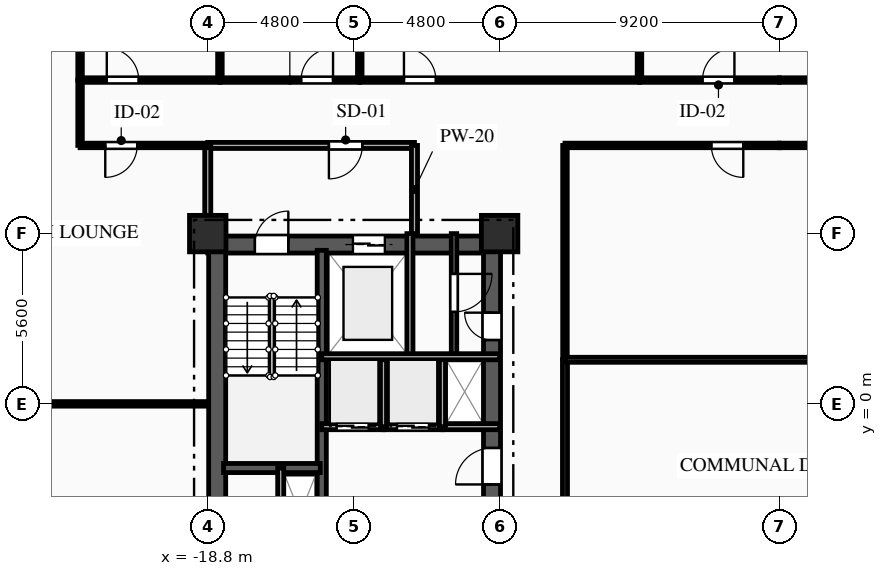
"""IFC4 building model, lengths in metres.
Left out: names, types, materials, properties, quantities, classifications, styles, units other than length and angle.
Written with IfcOpenShell. Run it as: python <this file> out.ifc"""

import sys

from ifc_helpers import new_model, si_unit, direction, frame, frame_2d, origin, origin_2d, place, context, subcontext, project, spatial, rectangle, extrude, element, fill, save


model = new_model("IFC4")
c1 = context("Model", 3, precision=1e-05, world=origin(), true_north=direction((0.0, 1.0)))
c2 = subcontext(c1, "Body", "Model", "MODEL_VIEW")
j1 = project(units=[si_unit("LENGTHUNIT", "METRE"), si_unit("PLANEANGLEUNIT", "RADIAN")], contexts=[c1])
p1 = place(None, origin())
s1 = spatial("IfcSite", under=j1, at=p1, CompositionType="ELEMENT")
p2 = place(p1, origin())
s2 = spatial("IfcBuilding", under=s1, at=p2, CompositionType="ELEMENT")
p3 = place(p2, frame((0.0, 0.0, 27.0)))
s3 = spatial("IfcBuildingStorey", under=s2, at=p3, CompositionType="ELEMENT", Elevation=27.0)
for number, where, z_axis, x_axis in (
    (1, (-18.8, 5.6, 0.0), (0.0, 0.0, 1.0), (1.0, 0.0, 0.0)),
    (2, (-9.2, 5.6, 0.0), (0.0, 0.0, 1.0), (1.0, 0.0, 0.0)),
):
    element("IfcColumn", number, at=place(p3, frame(where, z_axis=z_axis, x_axis=x_axis)), inside=s3, PredefinedType="COLUMN", context=c2, shape_type="SweptSolid", body=[
        extrude(rectangle(XDim=1.2, YDim=1.2, at=origin_2d()), origin(), (0.0, 0.0, 1.0), 3.35),
    ])
p4 = place(p3, frame((-18.8, 5.24, 0.0), z_axis=(0.0, 0.0, 1.0), x_axis=(1.0, 0.0, 0.0)))
e3 = element("IfcWall", 3, at=p4, inside=s3, PredefinedType="SHEAR", context=c2, shape_type="SweptSolid", body=[
    extrude(rectangle(XDim=9.6, YDim=0.56, at=frame_2d((4.8, 0.0))), origin(), (0.0, 0.0, 1.0), 3.035),
])
p5 = place(p4, frame((1.55, 0.0, 0.0)))
e4 = element("IfcOpeningElement", 4, at=p5, cuts=e3, PredefinedType="OPENING", context=c2, shape_type="SweptSolid", body=[
    extrude(rectangle(XDim=1.1, YDim=2.15, at=frame_2d((0.55, 1.075))), frame((0.0, 0.29, 0.0), z_axis=(0.0, -1.0, 0.0), x_axis=(1.0, 0.0, 0.0)), (0.0, 0.0, 1.0), 0.58),
])
p6 = place(p4, frame((4.775, 0.0, 0.0)))
e5 = element("IfcOpeningElement", 5, at=p6, cuts=e3, PredefinedType="OPENING", context=c2, shape_type="SweptSolid", body=[
    extrude(rectangle(XDim=1.05, YDim=2.1, at=frame_2d((0.525, 1.05))), frame((0.0, 0.29, 0.0), z_axis=(0.0, -1.0, 0.0), x_axis=(1.0, 0.0, 0.0)), (0.0, 0.0, 1.0), 0.58),
])
p7 = place(p3, frame((-18.49, -5.05, 0.0), z_axis=(0.0, 0.0, 1.0), x_axis=(0.0, 1.0, 0.0)))
e6 = element("IfcWall", 6, at=p7, inside=s3, PredefinedType="SHEAR", context=c2, shape_type="SweptSolid", body=[
    extrude(rectangle(XDim=10.1, YDim=0.56, at=frame_2d((5.05, 0.0))), origin(), (0.0, 0.0, 1.0), 3.035),
])
p8 = place(p3, frame((-9.45, -5.05, 0.0), z_axis=(0.0, 0.0, 1.0), x_axis=(0.0, 1.0, 0.0)))
e7 = element("IfcWall", 7, at=p8, inside=s3, PredefinedType="SHEAR", context=c2, shape_type="SweptSolid", body=[
    extrude(rectangle(XDim=10.1, YDim=0.56, at=frame_2d((5.05, 0.0))), origin(), (0.0, 0.0, 1.0), 3.035),
])
p9 = place(p8, frame((7.15, 0.0, 0.0)))
e8 = element("IfcOpeningElement", 8, at=p9, cuts=e7, PredefinedType="OPENING", context=c2, shape_type="SweptSolid", body=[
    extrude(rectangle(XDim=0.9, YDim=2.1, at=frame_2d((0.45, 1.05))), frame((0.0, 0.29, 0.0), z_axis=(0.0, -1.0, 0.0), x_axis=(1.0, 0.0, 0.0)), (0.0, 0.0, 1.0), 0.58),
])
p10 = place(p8, frame((2.4, 0.0, 0.0)))
e9 = element("IfcOpeningElement", 9, at=p10, cuts=e7, PredefinedType="OPENING", context=c2, shape_type="SweptSolid", body=[
    extrude(rectangle(XDim=1.2, YDim=2.15, at=frame_2d((0.6, 1.075))), frame((0.0, 0.29, 0.0), z_axis=(0.0, -1.0, 0.0), x_axis=(1.0, 0.0, 0.0)), (0.0, 0.0, 1.0), 0.58),
])
p11 = place(p3, frame((-15.05, -5.05, 0.0), z_axis=(0.0, 0.0, 1.0), x_axis=(0.0, 1.0, 0.0)))
e10 = element("IfcWall", 10, at=p11, inside=s3, PredefinedType="SHEAR", context=c2, shape_type="SweptSolid", body=[
    extrude(rectangle(XDim=10.1, YDim=0.3, at=frame_2d((5.05, 0.0))), origin(), (0.0, 0.0, 1.0), 3.035),
])
p12 = place(p3, frame((-18.28, -2.11, 0.0), z_axis=(0.0, 0.0, 1.0), x_axis=(1.0, 0.0, 0.0)))
e11 = element("IfcWall", 11, at=p12, inside=s3, PredefinedType="SHEAR", context=c2, shape_type="SweptSolid", body=[
    extrude(rectangle(XDim=3.18, YDim=0.3, at=frame_2d((1.59, 0.0))), origin(), (0.0, 0.0, 1.0), 3.035),
])
p13 = place(p3, frame((-16.4, -5.6, 0.0), z_axis=(0.0, 0.0, 1.0), x_axis=(0.0, 1.0, 0.0)))
e12 = element("IfcWall", 12, at=p13, inside=s3, PredefinedType="PARTITIONING", context=c2, shape_type="SweptSolid", body=[
    extrude(rectangle(XDim=3.49, YDim=0.2, at=frame_2d((1.745, 0.0))), origin(), (0.0, 0.0, 1.0), 3.035),
])
p14 = place(p3, frame((-12.15, 1.55, 0.0), z_axis=(0.0, 0.0, 1.0), x_axis=(0.0, 1.0, 0.0)))
e13 = element("IfcWall", 13, at=p14, inside=s3, PredefinedType="PARTITIONING", context=c2, shape_type="SweptSolid", body=[
    extrude(rectangle(XDim=4.05, YDim=0.2, at=frame_2d((2.025, 0.0))), origin(), (0.0, 0.0, 1.0), 3.035),
])
p15 = place(p3, frame((-12.0, 8.5, 0.0), z_axis=(0.0, 0.0, 1.0), x_axis=(-1.0, 0.0, 0.0)))
e14 = element("IfcWall", 14, at=p15, inside=s3, PredefinedType="PARTITIONING", context=c2, shape_type="SweptSolid", body=[
    extrude(rectangle(XDim=6.8, YDim=0.2, at=frame_2d((3.4, 0.0))), origin(), (0.0, 0.0, 1.0), 3.035),
])
p16 = place(p15, frame((1.715, 0.0, 0.0)))
e15 = element("IfcOpeningElement", 15, at=p16, cuts=e14, PredefinedType="OPENING", context=c2, shape_type="SweptSolid", body=[
    extrude(rectangle(XDim=1.1, YDim=2.15, at=frame_2d((0.55, 1.075))), frame((0.0, 0.11, 0.0), z_axis=(0.0, -1.0, 0.0), x_axis=(1.0, 0.0, 0.0)), (0.0, 0.0, 1.0), 0.22),
])
p17 = place(p3, frame((-12.0, 5.6, 0.0), z_axis=(0.0, 0.0, 1.0), x_axis=(0.0, 1.0, 0.0)))
e16 = element("IfcWall", 16, at=p17, inside=s3, PredefinedType="PARTITIONING", context=c2, shape_type="SweptSolid", body=[
    extrude(rectangle(XDim=2.9, YDim=0.2, at=frame_2d((1.45, 0.0))), origin(), (0.0, 0.0, 1.0), 3.035),
])
p18 = place(p3, frame((-18.8, 8.5, 0.0), z_axis=(0.0, 0.0, 1.0), x_axis=(0.0, -1.0, 0.0)))
e17 = element("IfcWall", 17, at=p18, inside=s3, PredefinedType="PARTITIONING", context=c2, shape_type="SweptSolid", body=[
    extrude(rectangle(XDim=2.9, YDim=0.2, at=frame_2d((1.45, 0.0))), origin(), (0.0, 0.0, 1.0), 2.52),
])
p19 = place(p3, frame((-10.7, 5.6, 0.0), z_axis=(0.0, 0.0, 1.0), x_axis=(0.0, -1.0, 0.0)))
e18 = element("IfcWall", 18, at=p19, inside=s3, PredefinedType="PARTITIONING", context=c2, shape_type="SweptSolid", body=[
    extrude(rectangle(XDim=4.05, YDim=0.18, at=frame_2d((2.025, 0.0))), origin(), (0.0, 0.0, 1.0), 3.035),
])
p20 = place(p19, frame((1.325, 0.0, 0.0)))
e19 = element("IfcOpeningElement", 19, at=p20, cuts=e18, PredefinedType="OPENING", context=c2, shape_type="SweptSolid", body=[
    extrude(rectangle(XDim=1.25, YDim=2.2, at=frame_2d((0.625, 1.1))), frame((0.0, 0.1, 0.0), z_axis=(0.0, -1.0, 0.0), x_axis=(1.0, 0.0, 0.0)), (0.0, 0.0, 1.0), 0.2),
])
p21 = place(p3, frame((-13.02, -0.75, 0.0), z_axis=(0.0, 0.0, 1.0), x_axis=(-1.0, 0.0, 0.0)))
e20 = element("IfcWall", 20, at=p21, inside=s3, PredefinedType="PARTITIONING", context=c2, shape_type="SweptSolid", body=[
    extrude(rectangle(XDim=2.03, YDim=0.2, at=frame_2d((1.015, 0.0))), origin(), (0.0, 0.0, 1.0), 3.035),
])
p22 = place(p21, frame((0.49, 0.0, 0.0)))
e21 = element("IfcOpeningElement", 21, at=p22, cuts=e20, PredefinedType="OPENING", context=c2, shape_type="SweptSolid", body=[
    extrude(rectangle(XDim=1.05, YDim=2.1, at=frame_2d((0.525, 1.05))), frame((0.0, 0.11, 0.0), z_axis=(0.0, -1.0, 0.0), x_axis=(1.0, 0.0, 0.0)), (0.0, 0.0, 1.0), 0.22),
])
p23 = place(p3, frame((-11.08, -0.75, 0.0), z_axis=(0.0, 0.0, 1.0), x_axis=(-1.0, 0.0, 0.0)))
e22 = element("IfcWall", 22, at=p23, inside=s3, PredefinedType="PARTITIONING", context=c2, shape_type="SweptSolid", body=[
    extrude(rectangle(XDim=1.94, YDim=0.2, at=frame_2d((0.97, 0.0))), origin(), (0.0, 0.0, 1.0), 3.035),
])
p24 = place(p23, frame((0.445, 0.0, 0.0)))
e23 = element("IfcOpeningElement", 23, at=p24, cuts=e22, PredefinedType="OPENING", context=c2, shape_type="SweptSolid", body=[
    extrude(rectangle(XDim=1.05, YDim=2.1, at=frame_2d((0.525, 1.05))), frame((0.0, 0.11, 0.0), z_axis=(0.0, -1.0, 0.0), x_axis=(1.0, 0.0, 0.0)), (0.0, 0.0, 1.0), 0.22),
])
p25 = place(p3, frame((-9.2, -0.75, 0.0), z_axis=(0.0, 0.0, 1.0), x_axis=(-1.0, 0.0, 0.0)))
e24 = element("IfcWall", 24, at=p25, inside=s3, PredefinedType="PARTITIONING", context=c2, shape_type="SweptSolid", body=[
    extrude(rectangle(XDim=1.88, YDim=0.2, at=frame_2d((0.94, 0.0))), origin(), (0.0, 0.0, 1.0), 3.035),
])
for number, where, z_axis, x_axis in (
    (25, (-13.02, -0.75, 0.0), (0.0, 0.0, 1.0), (0.0, 1.0, 0.0)),
    (26, (-11.08, -0.75, 0.0), (0.0, 0.0, 1.0), (0.0, 1.0, 0.0)),
):
    element("IfcWall", number, at=place(p3, frame(where, z_axis=z_axis, x_axis=x_axis)), inside=s3, PredefinedType="PARTITIONING", context=c2, shape_type="SweptSolid", body=[
        extrude(rectangle(XDim=2.3, YDim=0.2, at=frame_2d((1.15, 0.0))), origin(), (0.0, 0.0, 1.0), 3.035),
    ])
p26 = place(p3, frame((-18.8, 8.5, 0.0), z_axis=(0.0, 0.0, 1.0), x_axis=(-1.0, 0.0, 0.0)))
e27 = element("IfcWall", 27, at=p26, inside=s3, PredefinedType="PARTITIONING", context=c2, shape_type="SweptSolid", body=[
    extrude(rectangle(XDim=4.2, YDim=0.15, at=frame_2d((2.1, 0.0))), origin(), (0.0, 0.0, 1.0), 3.035),
])
p27 = place(p26, frame((2.321, 0.0, 0.0)))
e28 = element("IfcOpeningElement", 28, at=p27, cuts=e27, PredefinedType="OPENING", context=c2, shape_type="SweptSolid", body=[
    extrude(rectangle(XDim=1.05, YDim=2.15, at=frame_2d((0.525, 1.075))), frame((0.0, 0.085, 0.0), z_axis=(0.0, -1.0, 0.0), x_axis=(1.0, 0.0, 0.0)), (0.0, 0.0, 1.0), 0.17),
])
p28 = place(p3, frame((-23.0, 8.5, 0.0), z_axis=(0.0, 0.0, 1.0), x_axis=(0.0, 1.0, 0.0)))
e29 = element("IfcWall", 29, at=p28, inside=s3, PredefinedType="PARTITIONING", context=c2, shape_type="SweptSolid", body=[
    extrude(rectangle(XDim=2.15, YDim=0.15, at=frame_2d((1.075, 0.0))), origin(), (0.0, 0.0, 1.0), 3.035),
])
p29 = place(p3, frame((-23.0, 10.65, 0.0), z_axis=(0.0, 0.0, 1.0), x_axis=(1.0, 0.0, 0.0)))
e30 = element("IfcWall", 30, at=p29, inside=s3, PredefinedType="PARTITIONING", context=c2, shape_type="SweptSolid", body=[
    extrude(rectangle(XDim=4.6, YDim=0.15, at=frame_2d((2.3, 0.0))), origin(), (0.0, 0.0, 1.0), 3.035),
])
p30 = place(p29, frame((0.879, 0.0, 0.0)))
e31 = element("IfcOpeningElement", 31, at=p30, cuts=e30, PredefinedType="OPENING", context=c2, shape_type="SweptSolid", body=[
    extrude(rectangle(XDim=1.05, YDim=2.15, at=frame_2d((0.525, 1.075))), frame((0.0, 0.085, 0.0), z_axis=(0.0, -1.0, 0.0), x_axis=(1.0, 0.0, 0.0)), (0.0, 0.0, 1.0), 0.17),
])
p31 = place(p3, frame((-18.4, 10.65, 0.0), z_axis=(0.0, 0.0, 1.0), x_axis=(1.0, 0.0, 0.0)))
e32 = element("IfcWall", 32, at=p31, inside=s3, PredefinedType="PARTITIONING", context=c2, shape_type="SweptSolid", body=[
    extrude(rectangle(XDim=4.6, YDim=0.15, at=frame_2d((2.3, 0.0))), origin(), (0.0, 0.0, 1.0), 3.035),
])
p32 = place(p31, frame((2.671, 0.0, 0.0)))
e33 = element("IfcOpeningElement", 33, at=p32, cuts=e32, PredefinedType="OPENING", context=c2, shape_type="SweptSolid", body=[
    extrude(rectangle(XDim=1.05, YDim=2.15, at=frame_2d((0.525, 1.075))), frame((0.0, 0.085, 0.0), z_axis=(0.0, -1.0, 0.0), x_axis=(1.0, 0.0, 0.0)), (0.0, 0.0, 1.0), 0.17),
])
p33 = place(p3, frame((-13.8, 10.65, 0.0), z_axis=(0.0, 0.0, 1.0), x_axis=(1.0, 0.0, 0.0)))
e34 = element("IfcWall", 34, at=p33, inside=s3, PredefinedType="PARTITIONING", context=c2, shape_type="SweptSolid", body=[
    extrude(rectangle(XDim=9.2, YDim=0.15, at=frame_2d((4.6, 0.0))), origin(), (0.0, 0.0, 1.0), 3.035),
])
p34 = place(p33, frame((1.454, 0.0, 0.0)))
e35 = element("IfcOpeningElement", 35, at=p34, cuts=e34, PredefinedType="OPENING", context=c2, shape_type="SweptSolid", body=[
    extrude(rectangle(XDim=1.05, YDim=2.15, at=frame_2d((0.525, 1.075))), frame((0.0, 0.085, 0.0), z_axis=(0.0, -1.0, 0.0), x_axis=(1.0, 0.0, 0.0)), (0.0, 0.0, 1.0), 0.17),
])
p35 = place(p3, frame((-4.6, 10.65, 0.0), z_axis=(0.0, 0.0, 1.0), x_axis=(1.0, 0.0, 0.0)))
e36 = element("IfcWall", 36, at=p35, inside=s3, PredefinedType="PARTITIONING", context=c2, shape_type="SweptSolid", body=[
    extrude(rectangle(XDim=4.6, YDim=0.15, at=frame_2d((2.3, 0.0))), origin(), (0.0, 0.0, 1.0), 3.035),
])
p36 = place(p35, frame((2.074, 0.0, 0.0)))
e37 = element("IfcOpeningElement", 37, at=p36, cuts=e36, PredefinedType="OPENING", context=c2, shape_type="SweptSolid", body=[
    extrude(rectangle(XDim=1.05, YDim=2.15, at=frame_2d((0.525, 1.075))), frame((0.0, 0.085, 0.0), z_axis=(0.0, -1.0, 0.0), x_axis=(1.0, 0.0, 0.0)), (0.0, 0.0, 1.0), 0.17),
])
p37 = place(p3, frame((0.0, 8.5, 0.0), z_axis=(0.0, 0.0, 1.0), x_axis=(-1.0, 0.0, 0.0)))
e38 = element("IfcWall", 38, at=p37, inside=s3, PredefinedType="PARTITIONING", context=c2, shape_type="SweptSolid", body=[
    extrude(rectangle(XDim=7.05, YDim=0.15, at=frame_2d((3.525, 0.0))), origin(), (0.0, 0.0, 1.0), 3.035),
])
p38 = place(p37, frame((1.185, 0.0, 0.0)))
e39 = element("IfcOpeningElement", 39, at=p38, cuts=e38, PredefinedType="OPENING", context=c2, shape_type="SweptSolid", body=[
    extrude(rectangle(XDim=1.05, YDim=2.15, at=frame_2d((0.525, 1.075))), frame((0.0, 0.085, 0.0), z_axis=(0.0, -1.0, 0.0), x_axis=(1.0, 0.0, 0.0)), (0.0, 0.0, 1.0), 0.17),
])
p39 = place(p3, frame((0.0, 10.65, 0.0), z_axis=(0.0, 0.0, 1.0), x_axis=(1.0, 0.0, 0.0)))
e40 = element("IfcWall", 40, at=p39, inside=s3, PredefinedType="PARTITIONING", context=c2, shape_type="SweptSolid", body=[
    extrude(rectangle(XDim=4.6, YDim=0.15, at=frame_2d((2.3, 0.0))), origin(), (0.0, 0.0, 1.0), 3.035),
])
p40 = place(p3, frame((7.05, 8.5, 0.0), z_axis=(0.0, 0.0, 1.0), x_axis=(-1.0, 0.0, 0.0)))
e41 = element("IfcWall", 41, at=p40, inside=s3, PredefinedType="PARTITIONING", context=c2, shape_type="SweptSolid", body=[
    extrude(rectangle(XDim=7.05, YDim=0.15, at=frame_2d((3.525, 0.0))), origin(), (0.0, 0.0, 1.0), 3.035),
])
p41 = place(p3, frame((-7.05, 1.45, 0.0), z_axis=(0.0, 0.0, 1.0), x_axis=(0.0, -1.0, 0.0)))
e42 = element("IfcWall", 42, at=p41, inside=s3, PredefinedType="PARTITIONING", context=c2, shape_type="SweptSolid", body=[
    extrude(rectangle(XDim=7.05, YDim=0.165, at=frame_2d((3.525, 0.0))), origin(), (0.0, 0.0, 1.0), 3.035),
])
p42 = place(p3, frame((-7.05, 8.5, 0.0), z_axis=(0.0, 0.0, 1.0), x_axis=(0.0, -1.0, 0.0)))
e43 = element("IfcWall", 43, at=p42, inside=s3, PredefinedType="PARTITIONING", context=c2, shape_type="SweptSolid", body=[
    extrude(rectangle(XDim=7.05, YDim=0.15, at=frame_2d((3.525, 0.0))), origin(), (0.0, 0.0, 1.0), 3.035),
])
p43 = place(p3, frame((-32.8, 0.0, 0.0), z_axis=(0.0, 0.0, 1.0), x_axis=(1.0, 0.0, 0.0)))
e44 = element("IfcWall", 44, at=p43, inside=s3, PredefinedType="PARTITIONING", context=c2, shape_type="SweptSolid", body=[
    extrude(rectangle(XDim=14.0, YDim=0.15, at=frame_2d((7.0, 0.0))), origin(), (0.0, 0.0, 1.0), 3.035),
])
for number, where, z_axis, x_axis in (
    (45, (-23.0, 19.4, 0.0), (0.0, 0.0, 1.0), (0.0, -1.0, 0.0)),
    (46, (-18.4, 19.4, 0.0), (0.0, 0.0, 1.0), (0.0, -1.0, 0.0)),
    (47, (-13.8, 19.4, 0.0), (0.0, 0.0, 1.0), (0.0, -1.0, 0.0)),
    (48, (-4.6, 19.4, 0.0), (0.0, 0.0, 1.0), (0.0, -1.0, 0.0)),
):
    element("IfcWall", number, at=place(p3, frame(where, z_axis=z_axis, x_axis=x_axis)), inside=s3, PredefinedType="PARTITIONING", context=c2, shape_type="SweptSolid", body=[
        extrude(rectangle(XDim=8.75, YDim=0.15, at=frame_2d((4.375, 0.0))), origin(), (0.0, 0.0, 1.0), 3.035),
    ])
p44 = place(p3, frame((-7.05, 1.45, 0.0), z_axis=(0.0, 0.0, 1.0), x_axis=(1.0, 0.0, 0.0)))
e49 = element("IfcWall", 49, at=p44, inside=s3, PredefinedType="PARTITIONING", context=c2, shape_type="SweptSolid", body=[
    extrude(rectangle(XDim=14.1, YDim=0.165, at=frame_2d((7.05, 0.0))), origin(), (0.0, 0.0, 1.0), 3.035),
])
p45 = place(p3, frame((-15.05, 1.55, 0.0), z_axis=(0.0, 0.0, 1.0), x_axis=(1.0, 0.0, 0.0)))
e50 = element("IfcWall", 50, at=p45, inside=s3, PredefinedType="PARTITIONING", context=c2, shape_type="SweptSolid", body=[
    extrude(rectangle(XDim=5.85, YDim=0.2, at=frame_2d((2.925, 0.0))), origin(), (0.0, 0.0, 1.0), 3.035),
])
p46 = place(p5, origin())
e51 = element("IfcDoor", 51, at=p46, inside=s3, OperationType="SINGLE_SWING_RIGHT", PredefinedType="DOOR", context=c2, shape_type="SweptSolid", body=[
    extrude(rectangle(XDim=1.1, YDim=2.15, at=frame_2d((0.55, 1.075))), frame((0.0, 0.025, 0.0), z_axis=(0.0, -1.0, 0.0), x_axis=(1.0, 0.0, 0.0)), (0.0, 0.0, 1.0), 0.05),
])
fill(e4, e51)
p47 = place(p6, origin())
e52 = element("IfcDoor", 52, at=p47, inside=s3, OperationType="DOUBLE_DOOR_SLIDING", PredefinedType="DOOR", context=c2, shape_type="SweptSolid", body=[
    extrude(rectangle(XDim=1.05, YDim=2.1, at=frame_2d((0.525, 1.05))), frame((0.0, 0.025, 0.0), z_axis=(0.0, -1.0, 0.0), x_axis=(1.0, 0.0, 0.0)), (0.0, 0.0, 1.0), 0.05),
])
fill(e5, e52)
p48 = place(p16, origin())
e53 = element("IfcDoor", 53, at=p48, inside=s3, OperationType="SINGLE_SWING_RIGHT", PredefinedType="DOOR", context=c2, shape_type="SweptSolid", body=[
    extrude(rectangle(XDim=1.1, YDim=2.15, at=frame_2d((0.55, 1.075))), frame((0.0, 0.025, 0.0), z_axis=(0.0, -1.0, 0.0), x_axis=(1.0, 0.0, 0.0)), (0.0, 0.0, 1.0), 0.05),
])
fill(e15, e53)
p49 = place(p20, origin())
e54 = element("IfcDoor", 54, at=p49, inside=s3, OperationType="SINGLE_SWING_LEFT", PredefinedType="DOOR", context=c2, shape_type="SweptSolid", body=[
    extrude(rectangle(XDim=1.25, YDim=2.2, at=frame_2d((0.625, 1.1))), frame((0.0, 0.025, 0.0), z_axis=(0.0, -1.0, 0.0), x_axis=(1.0, 0.0, 0.0)), (0.0, 0.0, 1.0), 0.05),
])
fill(e19, e54)
p50 = place(p9, origin())
e55 = element("IfcDoor", 55, at=p50, inside=s3, OperationType="SINGLE_SWING_RIGHT", PredefinedType="DOOR", context=c2, shape_type="SweptSolid", body=[
    extrude(rectangle(XDim=0.9, YDim=2.1, at=frame_2d((0.45, 1.05))), frame((0.0, 0.025, 0.0), z_axis=(0.0, -1.0, 0.0), x_axis=(1.0, 0.0, 0.0)), (0.0, 0.0, 1.0), 0.05),
])
fill(e8, e55)
p51 = place(p22, origin())
e56 = element("IfcDoor", 56, at=p51, inside=s3, OperationType="DOUBLE_DOOR_SLIDING", PredefinedType="DOOR", context=c2, shape_type="SweptSolid", body=[
    extrude(rectangle(XDim=1.05, YDim=2.1, at=frame_2d((0.525, 1.05))), frame((0.0, 0.025, 0.0), z_axis=(0.0, -1.0, 0.0), x_axis=(1.0, 0.0, 0.0)), (0.0, 0.0, 1.0), 0.05),
])
fill(e21, e56)
p52 = place(p24, origin())
e57 = element("IfcDoor", 57, at=p52, inside=s3, OperationType="DOUBLE_DOOR_SLIDING", PredefinedType="DOOR", context=c2, shape_type="SweptSolid", body=[
    extrude(rectangle(XDim=1.05, YDim=2.1, at=frame_2d((0.525, 1.05))), frame((0.0, 0.025, 0.0), z_axis=(0.0, -1.0, 0.0), x_axis=(1.0, 0.0, 0.0)), (0.0, 0.0, 1.0), 0.05),
])
fill(e23, e57)
p53 = place(p10, origin())
e58 = element("IfcDoor", 58, at=p53, inside=s3, OperationType="SINGLE_SWING_LEFT", PredefinedType="DOOR", context=c2, shape_type="SweptSolid", body=[
    extrude(rectangle(XDim=1.2, YDim=2.15, at=frame_2d((0.6, 1.075))), frame((0.0, 0.025, 0.0), z_axis=(0.0, -1.0, 0.0), x_axis=(1.0, 0.0, 0.0)), (0.0, 0.0, 1.0), 0.05),
])
fill(e9, e58)
p54 = place(p27, origin())
e59 = element("IfcDoor", 59, at=p54, inside=s3, OperationType="SINGLE_SWING_RIGHT", PredefinedType="DOOR", context=c2, shape_type="SweptSolid", body=[
    extrude(rectangle(XDim=1.05, YDim=2.15, at=frame_2d((0.525, 1.075))), frame((0.0, 0.025, 0.0), z_axis=(0.0, -1.0, 0.0), x_axis=(1.0, 0.0, 0.0)), (0.0, 0.0, 1.0), 0.05),
])
fill(e28, e59)
p55 = place(p30, origin())
e60 = element("IfcDoor", 60, at=p55, inside=s3, OperationType="SINGLE_SWING_LEFT", PredefinedType="DOOR", context=c2, shape_type="SweptSolid", body=[
    extrude(rectangle(XDim=1.05, YDim=2.15, at=frame_2d((0.525, 1.075))), frame((0.0, 0.025, 0.0), z_axis=(0.0, -1.0, 0.0), x_axis=(1.0, 0.0, 0.0)), (0.0, 0.0, 1.0), 0.05),
])
fill(e31, e60)
p56 = place(p32, origin())
e61 = element("IfcDoor", 61, at=p56, inside=s3, OperationType="SINGLE_SWING_RIGHT", PredefinedType="DOOR", context=c2, shape_type="SweptSolid", body=[
    extrude(rectangle(XDim=1.05, YDim=2.15, at=frame_2d((0.525, 1.075))), frame((0.0, 0.025, 0.0), z_axis=(0.0, -1.0, 0.0), x_axis=(1.0, 0.0, 0.0)), (0.0, 0.0, 1.0), 0.05),
])
fill(e33, e61)
p57 = place(p34, origin())
e62 = element("IfcDoor", 62, at=p57, inside=s3, OperationType="SINGLE_SWING_LEFT", PredefinedType="DOOR", context=c2, shape_type="SweptSolid", body=[
    extrude(rectangle(XDim=1.05, YDim=2.15, at=frame_2d((0.525, 1.075))), frame((0.0, 0.025, 0.0), z_axis=(0.0, -1.0, 0.0), x_axis=(1.0, 0.0, 0.0)), (0.0, 0.0, 1.0), 0.05),
])
fill(e35, e62)
p58 = place(p36, origin())
e63 = element("IfcDoor", 63, at=p58, inside=s3, OperationType="SINGLE_SWING_RIGHT", PredefinedType="DOOR", context=c2, shape_type="SweptSolid", body=[
    extrude(rectangle(XDim=1.05, YDim=2.15, at=frame_2d((0.525, 1.075))), frame((0.0, 0.025, 0.0), z_axis=(0.0, -1.0, 0.0), x_axis=(1.0, 0.0, 0.0)), (0.0, 0.0, 1.0), 0.05),
])
fill(e37, e63)
p59 = place(p38, origin())
e64 = element("IfcDoor", 64, at=p59, inside=s3, OperationType="SINGLE_SWING_LEFT", PredefinedType="DOOR", context=c2, shape_type="SweptSolid", body=[
    extrude(rectangle(XDim=1.05, YDim=2.15, at=frame_2d((0.525, 1.075))), frame((0.0, 0.025, 0.0), z_axis=(0.0, -1.0, 0.0), x_axis=(1.0, 0.0, 0.0)), (0.0, 0.0, 1.0), 0.05),
])
fill(e39, e64)
save(model, sys.argv[1])
